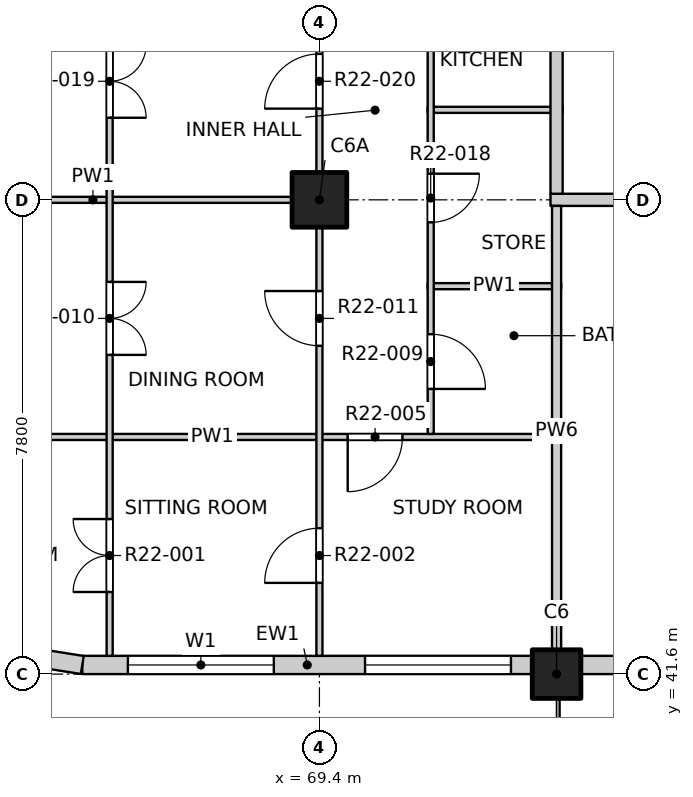
"""IFC4 building model, lengths in metres.
Left out: names, types, materials, properties, quantities, classifications, styles, units other than length and angle.
Written with IfcOpenShell. Run it as: python <this file> out.ifc"""

import sys

from ifc_helpers import new_model, si_unit, direction, frame, frame_2d, origin, origin_2d, place, context, subcontext, project, spatial, rectangle, extrude, element, fill, save


model = new_model("IFC4")
c1 = context("Model", 3, precision=1e-05, world=origin(), true_north=direction((0.0, 1.0)))
c2 = subcontext(c1, "Body", "Model", "MODEL_VIEW")
j1 = project(units=[si_unit("LENGTHUNIT", "METRE"), si_unit("PLANEANGLEUNIT", "RADIAN")], contexts=[c1])
p1 = place(None, origin())
s1 = spatial("IfcSite", under=j1, at=p1, CompositionType="ELEMENT")
p2 = place(p1, origin())
s2 = spatial("IfcBuilding", under=s1, at=p2, CompositionType="ELEMENT")
p3 = place(p2, frame((0.0, 0.0, 231.3)))
s3 = spatial("IfcBuildingStorey", under=s2, at=p3, CompositionType="ELEMENT", Elevation=231.3)
p4 = place(p3, frame((73.3, 41.6, -0.25), z_axis=(0.0, 0.0, 1.0), x_axis=(1.0, 0.0, 0.0)))
e1 = element("IfcColumn", 1, at=p4, inside=s3, PredefinedType="COLUMN", context=c2, shape_type="SweptSolid", body=[
    extrude(rectangle(XDim=0.8, YDim=0.8, at=origin_2d()), origin(), (0.0, 0.0, 1.0), 3.4),
])
p5 = place(p3, frame((69.4, 49.4, -0.25), z_axis=(0.0, 0.0, 1.0), x_axis=(1.0, 0.0, 0.0)))
e2 = element("IfcColumn", 2, at=p5, inside=s3, PredefinedType="COLUMN", context=c2, shape_type="SweptSolid", body=[
    extrude(rectangle(XDim=0.9, YDim=0.9, at=origin_2d()), origin(), (0.0, 0.0, 1.0), 3.4),
])
p6 = place(p3, frame((65.5, 41.75, 0.0), z_axis=(0.0, 0.0, 1.0), x_axis=(1.0, 0.0, 0.0)))
e3 = element("IfcWall", 3, at=p6, inside=s3, PredefinedType="SOLIDWALL", context=c2, shape_type="SweptSolid", body=[
    extrude(rectangle(XDim=7.4, YDim=0.3, at=frame_2d((3.7, 0.0))), origin(), (0.0, 0.0, 1.0), 2.7),
])
p7 = place(p6, frame((0.75, 0.0, 0.9)))
e4 = element("IfcOpeningElement", 4, at=p7, cuts=e3, PredefinedType="OPENING", context=c2, shape_type="SweptSolid", body=[
    extrude(rectangle(XDim=2.4, YDim=1.8, at=frame_2d((1.2, 0.9))), frame((0.0, 0.16, 0.0), z_axis=(0.0, -1.0, 0.0), x_axis=(1.0, 0.0, 0.0)), (0.0, 0.0, 1.0), 0.32),
])
p8 = place(p6, frame((4.65, 0.0, 0.9)))
e5 = element("IfcOpeningElement", 5, at=p8, cuts=e3, PredefinedType="OPENING", context=c2, shape_type="SweptSolid", body=[
    extrude(rectangle(XDim=2.4, YDim=1.8, at=frame_2d((1.2, 0.9))), frame((0.0, 0.16, 0.0), z_axis=(0.0, -1.0, 0.0), x_axis=(1.0, 0.0, 0.0)), (0.0, 0.0, 1.0), 0.32),
])
p9 = place(p3, frame((73.7, 41.75, 0.0), z_axis=(0.0, 0.0, 1.0), x_axis=(1.0, 0.0, 0.0)))
e6 = element("IfcWall", 6, at=p9, inside=s3, PredefinedType="SOLIDWALL", context=c2, shape_type="SweptSolid", body=[
    extrude(rectangle(XDim=7.0, YDim=0.3, at=frame_2d((3.5, 0.0))), origin(), (0.0, 0.0, 1.0), 2.7),
])
p10 = place(p9, frame((0.65, 0.0, 0.0)))
e7 = element("IfcOpeningElement", 7, at=p10, cuts=e6, PredefinedType="OPENING", context=c2, shape_type="SweptSolid", body=[
    extrude(rectangle(XDim=1.8, YDim=2.4, at=frame_2d((0.9, 1.2))), frame((0.0, 0.16, 0.0), z_axis=(0.0, -1.0, 0.0), x_axis=(1.0, 0.0, 0.0)), (0.0, 0.0, 1.0), 0.32),
])
p11 = place(p9, frame((4.25, 0.0, 0.9)))
e8 = element("IfcOpeningElement", 8, at=p11, cuts=e6, PredefinedType="OPENING", context=c2, shape_type="SweptSolid", body=[
    extrude(rectangle(XDim=2.4, YDim=1.8, at=frame_2d((1.2, 0.9))), frame((0.0, 0.16, 0.0), z_axis=(0.0, -1.0, 0.0), x_axis=(1.0, 0.0, 0.0)), (0.0, 0.0, 1.0), 0.32),
])
p12 = place(p3, frame((64.341, 41.934, 0.0), z_axis=(0.0, 0.0, 1.0), x_axis=(0.987678452879, -0.156496880861, 0.0)))
e9 = element("IfcWall", 9, at=p12, inside=s3, PredefinedType="SOLIDWALL", context=c2, shape_type="SweptSolid", body=[
    extrude(rectangle(XDim=1.173, YDim=0.3, at=frame_2d((0.586, 0.0))), origin(), (0.0, 0.0, 1.0), 2.7),
])
p13 = place(p3, frame((61.9, 45.5, 0.0), z_axis=(0.0, 0.0, 1.0), x_axis=(1.0, 0.0, 0.0)))
e10 = element("IfcWall", 10, at=p13, inside=s3, PredefinedType="PARTITIONING", context=c2, shape_type="SweptSolid", body=[
    extrude(rectangle(XDim=11.475, YDim=0.1, at=frame_2d((5.737, 0.0))), origin(), (0.0, 0.0, 1.0), 3.15),
])
p14 = place(p13, frame((7.965, 0.0, 0.0)))
e11 = element("IfcOpeningElement", 11, at=p14, cuts=e10, PredefinedType="OPENING", context=c2, shape_type="SweptSolid", body=[
    extrude(rectangle(XDim=0.9, YDim=2.1, at=frame_2d((0.45, 1.05))), frame((0.0, 0.06, 0.0), z_axis=(0.0, -1.0, 0.0), x_axis=(1.0, 0.0, 0.0)), (0.0, 0.0, 1.0), 0.12),
])
p15 = place(p3, frame((71.18, 47.98, 0.0), z_axis=(0.0, 0.0, 1.0), x_axis=(1.0, 0.0, 0.0)))
e12 = element("IfcWall", 12, at=p15, inside=s3, PredefinedType="PARTITIONING", context=c2, shape_type="SweptSolid", body=[
    extrude(rectangle(XDim=2.195, YDim=0.1, at=frame_2d((1.097, 0.0))), origin(), (0.0, 0.0, 1.0), 3.15),
])
p16 = place(p3, frame((61.9, 49.4, 0.0), z_axis=(0.0, 0.0, 1.0), x_axis=(1.0, 0.0, 0.0)))
e13 = element("IfcWall", 13, at=p16, inside=s3, PredefinedType="PARTITIONING", context=c2, shape_type="SweptSolid", body=[
    extrude(rectangle(XDim=7.55, YDim=0.1, at=frame_2d((3.775, 0.0))), origin(), (0.0, 0.0, 1.0), 3.15),
])
p17 = place(p3, frame((73.2, 49.4, 0.0), z_axis=(0.0, 0.0, 1.0), x_axis=(1.0, 0.0, 0.0)))
e14 = element("IfcWall", 14, at=p17, inside=s3, PredefinedType="PARTITIONING", context=c2, shape_type="SweptSolid", body=[
    extrude(rectangle(XDim=23.6, YDim=0.2, at=frame_2d((11.8, 0.0))), origin(), (0.0, 0.0, 1.0), 3.15),
])
p18 = place(p17, frame((5.35, 0.0, 0.0)))
e15 = element("IfcOpeningElement", 15, at=p18, cuts=e14, PredefinedType="OPENING", context=c2, shape_type="SweptSolid", body=[
    extrude(rectangle(XDim=1.2, YDim=2.1, at=frame_2d((0.6, 1.05))), frame((0.0, 0.11, 0.0), z_axis=(0.0, -1.0, 0.0), x_axis=(1.0, 0.0, 0.0)), (0.0, 0.0, 1.0), 0.22),
])
p19 = place(p17, frame((15.1, 0.0, 0.0)))
e16 = element("IfcOpeningElement", 16, at=p19, cuts=e14, PredefinedType="OPENING", context=c2, shape_type="SweptSolid", body=[
    extrude(rectangle(XDim=1.2, YDim=2.1, at=frame_2d((0.6, 1.05))), frame((0.0, 0.11, 0.0), z_axis=(0.0, -1.0, 0.0), x_axis=(1.0, 0.0, 0.0)), (0.0, 0.0, 1.0), 0.22),
])
p20 = place(p17, frame((21.1, 0.0, 0.0)))
e17 = element("IfcOpeningElement", 17, at=p20, cuts=e14, PredefinedType="OPENING", context=c2, shape_type="SweptSolid", body=[
    extrude(rectangle(XDim=0.9, YDim=2.1, at=frame_2d((0.45, 1.05))), frame((0.0, 0.11, 0.0), z_axis=(0.0, -1.0, 0.0), x_axis=(1.0, 0.0, 0.0)), (0.0, 0.0, 1.0), 0.22),
])
p21 = place(p3, frame((71.18, 50.88, 0.0), z_axis=(0.0, 0.0, 1.0), x_axis=(1.0, 0.0, 0.0)))
e18 = element("IfcWall", 18, at=p21, inside=s3, PredefinedType="PARTITIONING", context=c2, shape_type="SweptSolid", body=[
    extrude(rectangle(XDim=2.22, YDim=0.1, at=frame_2d((1.11, 0.0))), origin(), (0.0, 0.0, 1.0), 3.15),
])
p22 = place(p3, frame((65.95, 41.9, 0.0), z_axis=(0.0, 0.0, 1.0), x_axis=(0.0, 1.0, 0.0)))
e19 = element("IfcWall", 19, at=p22, inside=s3, PredefinedType="PARTITIONING", context=c2, shape_type="SweptSolid", body=[
    extrude(rectangle(XDim=19.1, YDim=0.1, at=frame_2d((9.55, 0.0))), origin(), (0.0, 0.0, 1.0), 3.15),
])
p23 = place(p22, frame((1.05, 0.0, 0.0)))
e20 = element("IfcOpeningElement", 20, at=p23, cuts=e19, PredefinedType="OPENING", context=c2, shape_type="SweptSolid", body=[
    extrude(rectangle(XDim=1.2, YDim=2.1, at=frame_2d((0.6, 1.05))), frame((0.0, 0.06, 0.0), z_axis=(0.0, -1.0, 0.0), x_axis=(1.0, 0.0, 0.0)), (0.0, 0.0, 1.0), 0.12),
])
p24 = place(p22, frame((4.95, 0.0, 0.0)))
e21 = element("IfcOpeningElement", 21, at=p24, cuts=e19, PredefinedType="OPENING", context=c2, shape_type="SweptSolid", body=[
    extrude(rectangle(XDim=1.2, YDim=2.1, at=frame_2d((0.6, 1.05))), frame((0.0, 0.06, 0.0), z_axis=(0.0, -1.0, 0.0), x_axis=(1.0, 0.0, 0.0)), (0.0, 0.0, 1.0), 0.12),
])
p25 = place(p22, frame((8.85, 0.0, 0.0)))
e22 = element("IfcOpeningElement", 22, at=p25, cuts=e19, PredefinedType="OPENING", context=c2, shape_type="SweptSolid", body=[
    extrude(rectangle(XDim=1.2, YDim=2.1, at=frame_2d((0.6, 1.05))), frame((0.0, 0.06, 0.0), z_axis=(0.0, -1.0, 0.0), x_axis=(1.0, 0.0, 0.0)), (0.0, 0.0, 1.0), 0.12),
])
p26 = place(p22, frame((11.925, 0.0, 0.0)))
e23 = element("IfcOpeningElement", 23, at=p26, cuts=e19, PredefinedType="OPENING", context=c2, shape_type="SweptSolid", body=[
    extrude(rectangle(XDim=0.9, YDim=2.1, at=frame_2d((0.45, 1.05))), frame((0.0, 0.06, 0.0), z_axis=(0.0, -1.0, 0.0), x_axis=(1.0, 0.0, 0.0)), (0.0, 0.0, 1.0), 0.12),
])
p27 = place(p22, frame((13.875, 0.0, 0.0)))
e24 = element("IfcOpeningElement", 24, at=p27, cuts=e19, PredefinedType="OPENING", context=c2, shape_type="SweptSolid", body=[
    extrude(rectangle(XDim=0.9, YDim=2.1, at=frame_2d((0.45, 1.05))), frame((0.0, 0.06, 0.0), z_axis=(0.0, -1.0, 0.0), x_axis=(1.0, 0.0, 0.0)), (0.0, 0.0, 1.0), 0.12),
])
p28 = place(p22, frame((15.825, 0.0, 0.0)))
e25 = element("IfcOpeningElement", 25, at=p28, cuts=e19, PredefinedType="OPENING", context=c2, shape_type="SweptSolid", body=[
    extrude(rectangle(XDim=0.9, YDim=2.1, at=frame_2d((0.45, 1.05))), frame((0.0, 0.06, 0.0), z_axis=(0.0, -1.0, 0.0), x_axis=(1.0, 0.0, 0.0)), (0.0, 0.0, 1.0), 0.12),
])
p29 = place(p22, frame((17.775, 0.0, 0.0)))
e26 = element("IfcOpeningElement", 26, at=p29, cuts=e19, PredefinedType="OPENING", context=c2, shape_type="SweptSolid", body=[
    extrude(rectangle(XDim=0.9, YDim=2.1, at=frame_2d((0.45, 1.05))), frame((0.0, 0.06, 0.0), z_axis=(0.0, -1.0, 0.0), x_axis=(1.0, 0.0, 0.0)), (0.0, 0.0, 1.0), 0.12),
])
p30 = place(p3, frame((69.4, 41.9, 0.0), z_axis=(0.0, 0.0, 1.0), x_axis=(0.0, 1.0, 0.0)))
e27 = element("IfcWall", 27, at=p30, inside=s3, PredefinedType="PARTITIONING", context=c2, shape_type="SweptSolid", body=[
    extrude(rectangle(XDim=46.2, YDim=0.1, at=frame_2d((23.1, 0.0))), origin(), (0.0, 0.0, 1.0), 3.15),
])
p31 = place(p30, frame((1.2, 0.0, 0.0)))
e28 = element("IfcOpeningElement", 28, at=p31, cuts=e27, PredefinedType="OPENING", context=c2, shape_type="SweptSolid", body=[
    extrude(rectangle(XDim=0.9, YDim=2.1, at=frame_2d((0.45, 1.05))), frame((0.0, 0.06, 0.0), z_axis=(0.0, -1.0, 0.0), x_axis=(1.0, 0.0, 0.0)), (0.0, 0.0, 1.0), 0.12),
])
p32 = place(p30, frame((5.1, 0.0, 0.0)))
e29 = element("IfcOpeningElement", 29, at=p32, cuts=e27, PredefinedType="OPENING", context=c2, shape_type="SweptSolid", body=[
    extrude(rectangle(XDim=0.9, YDim=2.1, at=frame_2d((0.45, 1.05))), frame((0.0, 0.06, 0.0), z_axis=(0.0, -1.0, 0.0), x_axis=(1.0, 0.0, 0.0)), (0.0, 0.0, 1.0), 0.12),
])
p33 = place(p30, frame((9.0, 0.0, 0.0)))
e30 = element("IfcOpeningElement", 30, at=p33, cuts=e27, PredefinedType="OPENING", context=c2, shape_type="SweptSolid", body=[
    extrude(rectangle(XDim=0.9, YDim=2.1, at=frame_2d((0.45, 1.05))), frame((0.0, 0.06, 0.0), z_axis=(0.0, -1.0, 0.0), x_axis=(1.0, 0.0, 0.0)), (0.0, 0.0, 1.0), 0.12),
])
p34 = place(p30, frame((13.85, 0.0, 0.0)))
e31 = element("IfcOpeningElement", 31, at=p34, cuts=e27, PredefinedType="OPENING", context=c2, shape_type="SweptSolid", body=[
    extrude(rectangle(XDim=0.9, YDim=2.1, at=frame_2d((0.45, 1.05))), frame((0.0, 0.06, 0.0), z_axis=(0.0, -1.0, 0.0), x_axis=(1.0, 0.0, 0.0)), (0.0, 0.0, 1.0), 0.12),
])
p35 = place(p30, frame((17.775, 0.0, 0.0)))
e32 = element("IfcOpeningElement", 32, at=p35, cuts=e27, PredefinedType="OPENING", context=c2, shape_type="SweptSolid", body=[
    extrude(rectangle(XDim=0.9, YDim=2.1, at=frame_2d((0.45, 1.05))), frame((0.0, 0.06, 0.0), z_axis=(0.0, -1.0, 0.0), x_axis=(1.0, 0.0, 0.0)), (0.0, 0.0, 1.0), 0.12),
])
p36 = place(p30, frame((21.625, 0.0, 0.0)))
e33 = element("IfcOpeningElement", 33, at=p36, cuts=e27, PredefinedType="OPENING", context=c2, shape_type="SweptSolid", body=[
    extrude(rectangle(XDim=0.9, YDim=2.1, at=frame_2d((0.45, 1.05))), frame((0.0, 0.06, 0.0), z_axis=(0.0, -1.0, 0.0), x_axis=(1.0, 0.0, 0.0)), (0.0, 0.0, 1.0), 0.12),
])
p37 = place(p30, frame((24.6, 0.0, 0.0)))
e34 = element("IfcOpeningElement", 34, at=p37, cuts=e27, PredefinedType="OPENING", context=c2, shape_type="SweptSolid", body=[
    extrude(rectangle(XDim=0.9, YDim=2.1, at=frame_2d((0.45, 1.05))), frame((0.0, 0.06, 0.0), z_axis=(0.0, -1.0, 0.0), x_axis=(1.0, 0.0, 0.0)), (0.0, 0.0, 1.0), 0.12),
])
p38 = place(p30, frame((29.425, 0.0, 0.0)))
e35 = element("IfcOpeningElement", 35, at=p38, cuts=e27, PredefinedType="OPENING", context=c2, shape_type="SweptSolid", body=[
    extrude(rectangle(XDim=0.9, YDim=2.1, at=frame_2d((0.45, 1.05))), frame((0.0, 0.06, 0.0), z_axis=(0.0, -1.0, 0.0), x_axis=(1.0, 0.0, 0.0)), (0.0, 0.0, 1.0), 0.12),
])
p39 = place(p30, frame((33.375, 0.0, 0.0)))
e36 = element("IfcOpeningElement", 36, at=p39, cuts=e27, PredefinedType="OPENING", context=c2, shape_type="SweptSolid", body=[
    extrude(rectangle(XDim=0.9, YDim=2.1, at=frame_2d((0.45, 1.05))), frame((0.0, 0.06, 0.0), z_axis=(0.0, -1.0, 0.0), x_axis=(1.0, 0.0, 0.0)), (0.0, 0.0, 1.0), 0.12),
])
p40 = place(p30, frame((36.3, 0.0, 0.0)))
e37 = element("IfcOpeningElement", 37, at=p40, cuts=e27, PredefinedType="OPENING", context=c2, shape_type="SweptSolid", body=[
    extrude(rectangle(XDim=0.9, YDim=2.1, at=frame_2d((0.45, 1.05))), frame((0.0, 0.06, 0.0), z_axis=(0.0, -1.0, 0.0), x_axis=(1.0, 0.0, 0.0)), (0.0, 0.0, 1.0), 0.12),
])
p41 = place(p30, frame((41.175, 0.0, 0.0)))
e38 = element("IfcOpeningElement", 38, at=p41, cuts=e27, PredefinedType="OPENING", context=c2, shape_type="SweptSolid", body=[
    extrude(rectangle(XDim=0.9, YDim=2.1, at=frame_2d((0.45, 1.05))), frame((0.0, 0.06, 0.0), z_axis=(0.0, -1.0, 0.0), x_axis=(1.0, 0.0, 0.0)), (0.0, 0.0, 1.0), 0.12),
])
p42 = place(p30, frame((44.1, 0.0, 0.0)))
e39 = element("IfcOpeningElement", 39, at=p42, cuts=e27, PredefinedType="OPENING", context=c2, shape_type="SweptSolid", body=[
    extrude(rectangle(XDim=0.9, YDim=2.1, at=frame_2d((0.45, 1.05))), frame((0.0, 0.06, 0.0), z_axis=(0.0, -1.0, 0.0), x_axis=(1.0, 0.0, 0.0)), (0.0, 0.0, 1.0), 0.12),
])
p43 = place(p3, frame((71.23, 45.55, 0.0), z_axis=(0.0, 0.0, 1.0), x_axis=(0.0, 1.0, 0.0)))
e40 = element("IfcWall", 40, at=p43, inside=s3, PredefinedType="PARTITIONING", context=c2, shape_type="SweptSolid", body=[
    extrude(rectangle(XDim=8.65, YDim=0.1, at=frame_2d((4.325, 0.0))), origin(), (0.0, 0.0, 1.0), 3.15),
])
p44 = place(p43, frame((0.74, 0.0, 0.0)))
e41 = element("IfcOpeningElement", 41, at=p44, cuts=e40, PredefinedType="OPENING", context=c2, shape_type="SweptSolid", body=[
    extrude(rectangle(XDim=0.9, YDim=2.1, at=frame_2d((0.45, 1.05))), frame((0.0, 0.06, 0.0), z_axis=(0.0, -1.0, 0.0), x_axis=(1.0, 0.0, 0.0)), (0.0, 0.0, 1.0), 0.12),
])
p45 = place(p43, frame((3.48, 0.0, 0.0)))
e42 = element("IfcOpeningElement", 42, at=p45, cuts=e40, PredefinedType="OPENING", context=c2, shape_type="SweptSolid", body=[
    extrude(rectangle(XDim=0.8, YDim=2.1, at=frame_2d((0.4, 1.05))), frame((0.0, 0.06, 0.0), z_axis=(0.0, -1.0, 0.0), x_axis=(1.0, 0.0, 0.0)), (0.0, 0.0, 1.0), 0.12),
])
p46 = place(p43, frame((6.565, 0.0, 0.0)))
e43 = element("IfcOpeningElement", 43, at=p46, cuts=e40, PredefinedType="OPENING", context=c2, shape_type="SweptSolid", body=[
    extrude(rectangle(XDim=0.9, YDim=2.1, at=frame_2d((0.45, 1.05))), frame((0.0, 0.06, 0.0), z_axis=(0.0, -1.0, 0.0), x_axis=(1.0, 0.0, 0.0)), (0.0, 0.0, 1.0), 0.12),
])
p47 = place(p3, frame((73.3, 41.9, 0.0), z_axis=(0.0, 0.0, 1.0), x_axis=(0.0, 1.0, 0.0)))
e44 = element("IfcWall", 44, at=p47, inside=s3, PredefinedType="PARTITIONING", context=c2, shape_type="SweptSolid", body=[
    extrude(rectangle(XDim=7.4, YDim=0.15, at=frame_2d((3.7, 0.0))), origin(), (0.0, 0.0, 1.0), 3.15),
])
p48 = place(p3, frame((73.3, 49.5, 0.0), z_axis=(0.0, 0.0, 1.0), x_axis=(0.0, 1.0, 0.0)))
e45 = element("IfcWall", 45, at=p48, inside=s3, PredefinedType="PARTITIONING", context=c2, shape_type="SweptSolid", body=[
    extrude(rectangle(XDim=34.9, YDim=0.2, at=frame_2d((17.45, 0.0))), origin(), (0.0, 0.0, 1.0), 3.15),
])
p49 = place(p48, frame((3.575, 0.0, 0.0)))
e46 = element("IfcOpeningElement", 46, at=p49, cuts=e45, PredefinedType="OPENING", context=c2, shape_type="SweptSolid", body=[
    extrude(rectangle(XDim=1.0, YDim=2.1, at=frame_2d((0.5, 1.05))), frame((0.0, 0.11, 0.0), z_axis=(0.0, -1.0, 0.0), x_axis=(1.0, 0.0, 0.0)), (0.0, 0.0, 1.0), 0.22),
])
p50 = place(p48, frame((18.075, 0.0, 0.0)))
e47 = element("IfcOpeningElement", 47, at=p50, cuts=e45, PredefinedType="OPENING", context=c2, shape_type="SweptSolid", body=[
    extrude(rectangle(XDim=1.0, YDim=2.1, at=frame_2d((0.5, 1.05))), frame((0.0, 0.11, 0.0), z_axis=(0.0, -1.0, 0.0), x_axis=(1.0, 0.0, 0.0)), (0.0, 0.0, 1.0), 0.22),
])
p51 = place(p48, frame((26.175, 0.0, 0.0)))
e48 = element("IfcOpeningElement", 48, at=p51, cuts=e45, PredefinedType="OPENING", context=c2, shape_type="SweptSolid", body=[
    extrude(rectangle(XDim=1.0, YDim=2.1, at=frame_2d((0.5, 1.05))), frame((0.0, 0.11, 0.0), z_axis=(0.0, -1.0, 0.0), x_axis=(1.0, 0.0, 0.0)), (0.0, 0.0, 1.0), 0.22),
])
p52 = place(p7, origin())
e49 = element("IfcWindow", 49, at=p52, inside=s3, PartitioningType="DOUBLE_PANEL_VERTICAL", PredefinedType="WINDOW", context=c2, shape_type="SweptSolid", body=[
    extrude(rectangle(XDim=2.4, YDim=1.8, at=frame_2d((1.2, 0.9))), frame((0.0, 0.03, 0.0), z_axis=(0.0, -1.0, 0.0), x_axis=(1.0, 0.0, 0.0)), (0.0, 0.0, 1.0), 0.06),
])
fill(e4, e49)
p53 = place(p8, origin())
e50 = element("IfcWindow", 50, at=p53, inside=s3, PartitioningType="DOUBLE_PANEL_VERTICAL", PredefinedType="WINDOW", context=c2, shape_type="SweptSolid", body=[
    extrude(rectangle(XDim=2.4, YDim=1.8, at=frame_2d((1.2, 0.9))), frame((0.0, 0.03, 0.0), z_axis=(0.0, -1.0, 0.0), x_axis=(1.0, 0.0, 0.0)), (0.0, 0.0, 1.0), 0.06),
])
fill(e5, e50)
p54 = place(p23, origin())
e51 = element("IfcDoor", 51, at=p54, inside=s3, OperationType="DOUBLE_DOOR_SINGLE_SWING", PredefinedType="DOOR", context=c2, shape_type="SweptSolid", body=[
    extrude(rectangle(XDim=1.2, YDim=2.1, at=frame_2d((0.6, 1.05))), frame((0.0, 0.025, 0.0), z_axis=(0.0, -1.0, 0.0), x_axis=(1.0, 0.0, 0.0)), (0.0, 0.0, 1.0), 0.05),
])
fill(e20, e51)
p55 = place(p31, origin())
e52 = element("IfcDoor", 52, at=p55, inside=s3, OperationType="SINGLE_SWING_LEFT", PredefinedType="DOOR", context=c2, shape_type="SweptSolid", body=[
    extrude(rectangle(XDim=0.9, YDim=2.1, at=frame_2d((0.45, 1.05))), frame((0.0, 0.025, 0.0), z_axis=(0.0, -1.0, 0.0), x_axis=(1.0, 0.0, 0.0)), (0.0, 0.0, 1.0), 0.05),
])
fill(e28, e52)
p56 = place(p14, origin())
e53 = element("IfcDoor", 53, at=p56, inside=s3, OperationType="SINGLE_SWING_RIGHT", PredefinedType="DOOR", context=c2, shape_type="SweptSolid", body=[
    extrude(rectangle(XDim=0.9, YDim=2.1, at=frame_2d((0.45, 1.05))), frame((0.0, 0.025, 0.0), z_axis=(0.0, -1.0, 0.0), x_axis=(1.0, 0.0, 0.0)), (0.0, 0.0, 1.0), 0.05),
])
fill(e11, e53)
p57 = place(p44, origin())
e54 = element("IfcDoor", 54, at=p57, inside=s3, OperationType="SINGLE_SWING_RIGHT", PredefinedType="DOOR", context=c2, shape_type="SweptSolid", body=[
    extrude(rectangle(XDim=0.9, YDim=2.1, at=frame_2d((0.45, 1.05))), frame((0.0, 0.025, 0.0), z_axis=(0.0, -1.0, 0.0), x_axis=(1.0, 0.0, 0.0)), (0.0, 0.0, 1.0), 0.05),
])
fill(e41, e54)
p58 = place(p24, origin())
e55 = element("IfcDoor", 55, at=p58, inside=s3, OperationType="DOUBLE_DOOR_SINGLE_SWING", PredefinedType="DOOR", context=c2, shape_type="SweptSolid", body=[
    extrude(rectangle(XDim=1.2, YDim=2.1, at=frame_2d((0.6, 1.05))), frame((0.0, 0.025, 0.0), z_axis=(0.0, -1.0, 0.0), x_axis=(1.0, 0.0, 0.0)), (0.0, 0.0, 1.0), 0.05),
])
fill(e21, e55)
p59 = place(p32, origin())
e56 = element("IfcDoor", 56, at=p59, inside=s3, OperationType="SINGLE_SWING_RIGHT", PredefinedType="DOOR", context=c2, shape_type="SweptSolid", body=[
    extrude(rectangle(XDim=0.9, YDim=2.1, at=frame_2d((0.45, 1.05))), frame((0.0, 0.025, 0.0), z_axis=(0.0, -1.0, 0.0), x_axis=(1.0, 0.0, 0.0)), (0.0, 0.0, 1.0), 0.05),
])
fill(e29, e56)
p60 = place(p45, origin())
e57 = element("IfcDoor", 57, at=p60, inside=s3, OperationType="SINGLE_SWING_LEFT", PredefinedType="DOOR", context=c2, shape_type="SweptSolid", body=[
    extrude(rectangle(XDim=0.8, YDim=2.1, at=frame_2d((0.4, 1.05))), frame((0.0, 0.025, 0.0), z_axis=(0.0, -1.0, 0.0), x_axis=(1.0, 0.0, 0.0)), (0.0, 0.0, 1.0), 0.05),
])
fill(e42, e57)
p61 = place(p25, origin())
e58 = element("IfcDoor", 58, at=p61, inside=s3, OperationType="DOUBLE_DOOR_SINGLE_SWING", PredefinedType="DOOR", context=c2, shape_type="SweptSolid", body=[
    extrude(rectangle(XDim=1.2, YDim=2.1, at=frame_2d((0.6, 1.05))), frame((0.0, 0.025, 0.0), z_axis=(0.0, -1.0, 0.0), x_axis=(1.0, 0.0, 0.0)), (0.0, 0.0, 1.0), 0.05),
])
fill(e22, e58)
p62 = place(p33, origin())
e59 = element("IfcDoor", 59, at=p62, inside=s3, OperationType="SINGLE_SWING_LEFT", PredefinedType="DOOR", context=c2, shape_type="SweptSolid", body=[
    extrude(rectangle(XDim=0.9, YDim=2.1, at=frame_2d((0.45, 1.05))), frame((0.0, 0.025, 0.0), z_axis=(0.0, -1.0, 0.0), x_axis=(1.0, 0.0, 0.0)), (0.0, 0.0, 1.0), 0.05),
])
fill(e30, e59)
save(model, sys.argv[1])
